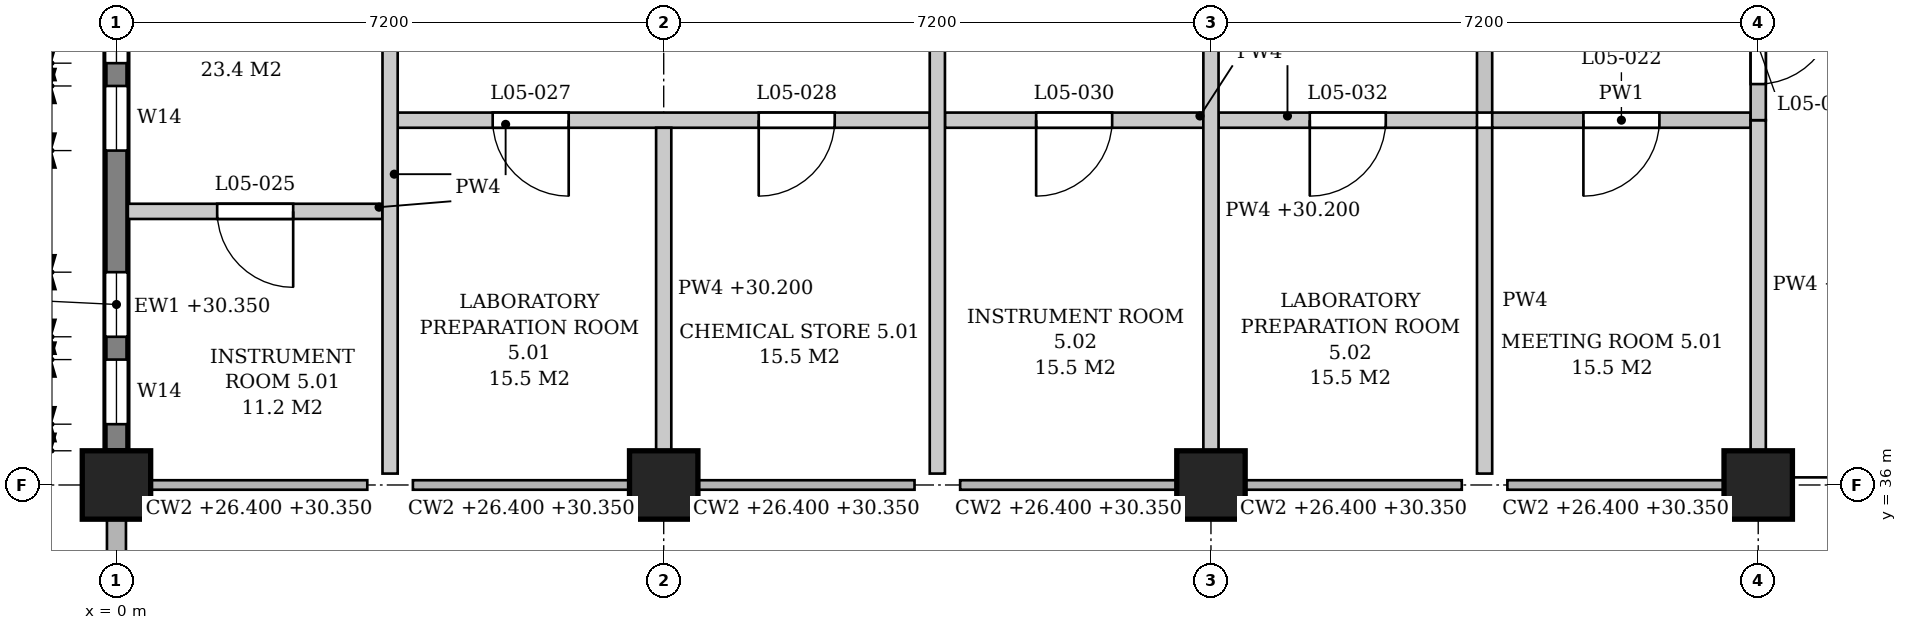
"""IFC4 building model, lengths in metres.
Left out: names, types, materials, properties, quantities, classifications, styles, units other than length and angle.
Written with IfcOpenShell. Run it as: python <this file> out.ifc"""

import sys

from ifc_helpers import new_model, si_unit, direction, frame, frame_2d, origin, origin_2d, place, context, subcontext, project, spatial, polyline, rectangle, outline, extrude, element, fill, save


model = new_model("IFC4")
c1 = context("Model", 3, precision=1e-05, world=origin(), true_north=direction((0.0, 1.0)))
c2 = subcontext(c1, "Body", "Model", "MODEL_VIEW")
j1 = project(units=[si_unit("LENGTHUNIT", "METRE"), si_unit("PLANEANGLEUNIT", "RADIAN")], contexts=[c1])
p1 = place(None, origin())
s1 = spatial("IfcSite", under=j1, at=p1, CompositionType="ELEMENT")
p2 = place(p1, origin())
s2 = spatial("IfcBuilding", under=s1, at=p2, CompositionType="ELEMENT")
p3 = place(p2, frame((0.0, 0.0, 26.4)))
s3 = spatial("IfcBuildingStorey", under=s2, at=p3, CompositionType="ELEMENT", Elevation=26.4)
for number, where, z_axis, x_axis in (
    (1, (0.0, 36.0, 0.0), (0.0, 0.0, 1.0), (1.0, 0.0, 0.0)),
    (2, (7.2, 36.0, 0.0), (0.0, 0.0, 1.0), (1.0, 0.0, 0.0)),
    (3, (14.4, 36.0, 0.0), (0.0, 0.0, 1.0), (1.0, 0.0, 0.0)),
    (4, (21.6, 36.0, 0.0), (0.0, 0.0, 1.0), (1.0, 0.0, 0.0)),
):
    element("IfcColumn", number, at=place(p3, frame(where, z_axis=z_axis, x_axis=x_axis)), inside=s3, PredefinedType="COLUMN", context=c2, shape_type="SweptSolid", body=[
        extrude(rectangle(XDim=0.9, YDim=0.9, at=origin_2d()), origin(), (0.0, 0.0, 1.0), 4.8),
    ])
p4 = place(p3, frame((0.0, 36.45, 0.0), z_axis=(0.0, 0.0, 1.0), x_axis=(0.0, 1.0, 0.0)))
e5 = element("IfcWall", 5, at=p4, inside=s3, PredefinedType="STANDARD", context=c2, shape_type="SweptSolid", body=[
    extrude(rectangle(XDim=6.3, YDim=0.3, at=frame_2d((3.15, 0.0))), origin(), (0.0, 0.0, 1.0), 3.95),
])
p5 = place(p4, frame((0.35, 0.0, 0.9)))
e6 = element("IfcOpeningElement", 6, at=p5, cuts=e5, PredefinedType="OPENING", context=c2, shape_type="SweptSolid", body=[
    extrude(outline(polyline([(0.0, 0.0), (0.85, 0.0), (0.85, 2.05), (0.425, 2.5), (0.0, 2.05), (0.0, 0.0)])), frame((0.0, 0.16, 0.0), z_axis=(0.0, -1.0, 0.0), x_axis=(1.0, 0.0, 0.0)), (0.0, 0.0, 1.0), 0.32),
])
p6 = place(p4, frame((1.5, 0.0, 0.9)))
e7 = element("IfcOpeningElement", 7, at=p6, cuts=e5, PredefinedType="OPENING", context=c2, shape_type="SweptSolid", body=[
    extrude(outline(polyline([(0.0, 0.0), (0.85, 0.0), (0.85, 2.05), (0.425, 2.5), (0.0, 2.05), (0.0, 0.0)])), frame((0.0, 0.16, 0.0), z_axis=(0.0, -1.0, 0.0), x_axis=(1.0, 0.0, 0.0)), (0.0, 0.0, 1.0), 0.32),
])
p7 = place(p4, frame((3.95, 0.0, 0.9)))
e8 = element("IfcOpeningElement", 8, at=p7, cuts=e5, PredefinedType="OPENING", context=c2, shape_type="SweptSolid", body=[
    extrude(outline(polyline([(0.0, 0.0), (0.85, 0.0), (0.85, 2.05), (0.425, 2.5), (0.0, 2.05), (0.0, 0.0)])), frame((0.0, 0.16, 0.0), z_axis=(0.0, -1.0, 0.0), x_axis=(1.0, 0.0, 0.0)), (0.0, 0.0, 1.0), 0.32),
])
p8 = place(p4, frame((5.1, 0.0, 0.9)))
e9 = element("IfcOpeningElement", 9, at=p8, cuts=e5, PredefinedType="OPENING", context=c2, shape_type="SweptSolid", body=[
    extrude(outline(polyline([(0.0, 0.0), (0.85, 0.0), (0.85, 2.05), (0.425, 2.5), (0.0, 2.05), (0.0, 0.0)])), frame((0.0, 0.16, 0.0), z_axis=(0.0, -1.0, 0.0), x_axis=(1.0, 0.0, 0.0)), (0.0, 0.0, 1.0), 0.32),
])
p9 = place(p3, frame((0.15, 39.6, 0.0), z_axis=(0.0, 0.0, 1.0), x_axis=(1.0, 0.0, 0.0)))
e10 = element("IfcWall", 10, at=p9, inside=s3, PredefinedType="PARTITIONING", context=c2, shape_type="SweptSolid", body=[
    extrude(outline(polyline([(0.0, 0.0), (3.35, 0.0), (3.35, 4.55), (0.1, 4.55), (0.1, 3.95), (0.0, 3.95), (0.0, 0.0)])), frame((0.0, 0.1, 0.0), z_axis=(0.0, -1.0, 0.0), x_axis=(1.0, 0.0, 0.0)), (0.0, 0.0, 1.0), 0.2),
])
p10 = place(p9, frame((1.175, 0.0, 0.0)))
e11 = element("IfcOpeningElement", 11, at=p10, cuts=e10, PredefinedType="OPENING", context=c2, shape_type="SweptSolid", body=[
    extrude(rectangle(XDim=1.0, YDim=2.1, at=frame_2d((0.5, 1.05))), frame((0.0, 0.11, 0.0), z_axis=(0.0, -1.0, 0.0), x_axis=(1.0, 0.0, 0.0)), (0.0, 0.0, 1.0), 0.22),
])
p11 = place(p3, frame((3.7, 40.8, 0.0), z_axis=(0.0, 0.0, 1.0), x_axis=(1.0, 0.0, 0.0)))
e12 = element("IfcWall", 12, at=p11, inside=s3, PredefinedType="PARTITIONING", context=c2, shape_type="SweptSolid", body=[
    extrude(outline(polyline([(0.0, 0.0), (7.0, 0.0), (7.0, 4.55), (3.75, 4.55), (3.75, 3.8), (3.25, 3.8), (3.25, 4.55), (0.0, 4.55), (0.0, 0.0)])), frame((0.0, 0.1, 0.0), z_axis=(0.0, -1.0, 0.0), x_axis=(1.0, 0.0, 0.0)), (0.0, 0.0, 1.0), 0.2),
])
p12 = place(p11, frame((1.25, 0.0, 0.0)))
e13 = element("IfcOpeningElement", 13, at=p12, cuts=e12, PredefinedType="OPENING", context=c2, shape_type="SweptSolid", body=[
    extrude(rectangle(XDim=1.0, YDim=2.1, at=frame_2d((0.5, 1.05))), frame((0.0, 0.11, 0.0), z_axis=(0.0, -1.0, 0.0), x_axis=(1.0, 0.0, 0.0)), (0.0, 0.0, 1.0), 0.22),
])
p13 = place(p11, frame((4.75, 0.0, 0.0)))
e14 = element("IfcOpeningElement", 14, at=p13, cuts=e12, PredefinedType="OPENING", context=c2, shape_type="SweptSolid", body=[
    extrude(rectangle(XDim=1.0, YDim=2.1, at=frame_2d((0.5, 1.05))), frame((0.0, 0.11, 0.0), z_axis=(0.0, -1.0, 0.0), x_axis=(1.0, 0.0, 0.0)), (0.0, 0.0, 1.0), 0.22),
])
p14 = place(p3, frame((10.9, 40.8, 0.0), z_axis=(0.0, 0.0, 1.0), x_axis=(1.0, 0.0, 0.0)))
e15 = element("IfcWall", 15, at=p14, inside=s3, PredefinedType="PARTITIONING", context=c2, shape_type="SweptSolid", body=[
    extrude(outline(polyline([(0.0, 0.0), (3.4, 0.0), (3.4, 3.8), (3.25, 3.8), (3.25, 4.55), (0.0, 4.55), (0.0, 0.0)])), frame((0.0, 0.1, 0.0), z_axis=(0.0, -1.0, 0.0), x_axis=(1.0, 0.0, 0.0)), (0.0, 0.0, 1.0), 0.2),
])
p15 = place(p14, frame((1.2, 0.0, 0.0)))
e16 = element("IfcOpeningElement", 16, at=p15, cuts=e15, PredefinedType="OPENING", context=c2, shape_type="SweptSolid", body=[
    extrude(rectangle(XDim=1.0, YDim=2.1, at=frame_2d((0.5, 1.05))), frame((0.0, 0.11, 0.0), z_axis=(0.0, -1.0, 0.0), x_axis=(1.0, 0.0, 0.0)), (0.0, 0.0, 1.0), 0.22),
])
p16 = place(p3, frame((14.5, 40.8, 0.0), z_axis=(0.0, 0.0, 1.0), x_axis=(1.0, 0.0, 0.0)))
e17 = element("IfcWall", 17, at=p16, inside=s3, PredefinedType="PARTITIONING", context=c2, shape_type="SweptSolid", body=[
    extrude(outline(polyline([(0.0, 0.0), (3.4, 0.0), (3.4, 4.55), (0.15, 4.55), (0.15, 3.8), (0.0, 3.8), (0.0, 0.0)])), frame((0.0, 0.1, 0.0), z_axis=(0.0, -1.0, 0.0), x_axis=(1.0, 0.0, 0.0)), (0.0, 0.0, 1.0), 0.2),
])
p17 = place(p16, frame((1.2, 0.0, 0.0)))
e18 = element("IfcOpeningElement", 18, at=p17, cuts=e17, PredefinedType="OPENING", context=c2, shape_type="SweptSolid", body=[
    extrude(rectangle(XDim=1.0, YDim=2.1, at=frame_2d((0.5, 1.05))), frame((0.0, 0.11, 0.0), z_axis=(0.0, -1.0, 0.0), x_axis=(1.0, 0.0, 0.0)), (0.0, 0.0, 1.0), 0.22),
])
p18 = place(p3, frame((18.1, 40.8, 0.0), z_axis=(0.0, 0.0, 1.0), x_axis=(1.0, 0.0, 0.0)))
e19 = element("IfcWall", 19, at=p18, inside=s3, PredefinedType="PARTITIONING", context=c2, shape_type="SweptSolid", body=[
    extrude(outline(polyline([(0.0, 0.0), (3.4, 0.0), (3.4, 3.8), (3.25, 3.8), (3.25, 4.55), (0.0, 4.55), (0.0, 0.0)])), frame((0.0, 0.1, 0.0), z_axis=(0.0, -1.0, 0.0), x_axis=(1.0, 0.0, 0.0)), (0.0, 0.0, 1.0), 0.2),
])
p19 = place(p18, frame((1.2, 0.0, 0.0)))
e20 = element("IfcOpeningElement", 20, at=p19, cuts=e19, PredefinedType="OPENING", context=c2, shape_type="SweptSolid", body=[
    extrude(rectangle(XDim=1.0, YDim=2.1, at=frame_2d((0.5, 1.05))), frame((0.0, 0.11, 0.0), z_axis=(0.0, -1.0, 0.0), x_axis=(1.0, 0.0, 0.0)), (0.0, 0.0, 1.0), 0.22),
])
p20 = place(p3, frame((3.6, 36.15, 0.0), z_axis=(0.0, 0.0, 1.0), x_axis=(0.0, 1.0, 0.0)))
e21 = element("IfcWall", 21, at=p20, inside=s3, PredefinedType="PARTITIONING", context=c2, shape_type="SweptSolid", body=[
    extrude(outline(polyline([(0.0, 0.0), (10.65, 0.0), (10.65, 4.55), (7.3, 4.55), (7.3, 3.8), (6.8, 3.8), (6.8, 4.55), (0.1, 4.55), (0.1, 3.95), (0.0, 3.95), (0.0, 0.0)])), frame((0.0, 0.1, 0.0), z_axis=(0.0, -1.0, 0.0), x_axis=(1.0, 0.0, 0.0)), (0.0, 0.0, 1.0), 0.2),
])
p21 = place(p3, frame((7.2, 36.45, 0.0), z_axis=(0.0, 0.0, 1.0), x_axis=(0.0, 1.0, 0.0)))
e22 = element("IfcWall", 22, at=p21, inside=s3, PredefinedType="PARTITIONING", context=c2, shape_type="SweptSolid", body=[
    extrude(rectangle(XDim=4.25, YDim=0.2, at=frame_2d((2.125, 0.0))), origin(), (0.0, 0.0, 1.0), 3.8),
])
p22 = place(p3, frame((10.8, 36.15, 0.0), z_axis=(0.0, 0.0, 1.0), x_axis=(0.0, 1.0, 0.0)))
e23 = element("IfcWall", 23, at=p22, inside=s3, PredefinedType="PARTITIONING", context=c2, shape_type="SweptSolid", body=[
    extrude(outline(polyline([(0.0, 0.0), (11.75, 0.0), (11.75, 4.55), (7.3, 4.55), (7.3, 3.8), (6.8, 3.8), (6.8, 4.55), (0.1, 4.55), (0.1, 3.95), (0.0, 3.95), (0.0, 0.0)])), frame((0.0, 0.1, 0.0), z_axis=(0.0, -1.0, 0.0), x_axis=(1.0, 0.0, 0.0)), (0.0, 0.0, 1.0), 0.2),
])
p23 = place(p3, frame((14.4, 36.45, 0.0), z_axis=(0.0, 0.0, 1.0), x_axis=(0.0, 1.0, 0.0)))
e24 = element("IfcWall", 24, at=p23, inside=s3, PredefinedType="PARTITIONING", context=c2, shape_type="SweptSolid", body=[
    extrude(rectangle(XDim=6.3, YDim=0.2, at=frame_2d((3.15, 0.0))), origin(), (0.0, 0.0, 1.0), 3.8),
])
p24 = place(p3, frame((18.0, 36.15, 0.0), z_axis=(0.0, 0.0, 1.0), x_axis=(0.0, 1.0, 0.0)))
e25 = element("IfcWall", 25, at=p24, inside=s3, PredefinedType="PARTITIONING", context=c2, shape_type="SweptSolid", body=[
    extrude(outline(polyline([(0.0, 0.0), (4.55, 0.0), (4.55, 4.55), (0.1, 4.55), (0.1, 3.95), (0.0, 3.95), (0.0, 0.0)])), frame((0.0, 0.1, 0.0), z_axis=(0.0, -1.0, 0.0), x_axis=(1.0, 0.0, 0.0)), (0.0, 0.0, 1.0), 0.2),
])
p25 = place(p3, frame((18.0, 40.9, 0.0), z_axis=(0.0, 0.0, 1.0), x_axis=(0.0, 1.0, 0.0)))
e26 = element("IfcWall", 26, at=p25, inside=s3, PredefinedType="PARTITIONING", context=c2, shape_type="SweptSolid", body=[
    extrude(outline(polyline([(0.0, 0.0), (7.0, 0.0), (7.0, 4.55), (2.55, 4.55), (2.55, 3.8), (2.05, 3.8), (2.05, 4.55), (0.0, 4.55), (0.0, 0.0)])), frame((0.0, 0.1, 0.0), z_axis=(0.0, -1.0, 0.0), x_axis=(1.0, 0.0, 0.0)), (0.0, 0.0, 1.0), 0.2),
])
p26 = place(p25, frame((3.0, 0.0, 0.0)))
e27 = element("IfcOpeningElement", 27, at=p26, cuts=e26, PredefinedType="OPENING", context=c2, shape_type="SweptSolid", body=[
    extrude(rectangle(XDim=1.0, YDim=2.1, at=frame_2d((0.5, 1.05))), frame((0.0, 0.11, 0.0), z_axis=(0.0, -1.0, 0.0), x_axis=(1.0, 0.0, 0.0)), (0.0, 0.0, 1.0), 0.22),
])
p27 = place(p3, frame((21.6, 36.45, 0.0), z_axis=(0.0, 0.0, 1.0), x_axis=(0.0, 1.0, 0.0)))
e28 = element("IfcWall", 28, at=p27, inside=s3, PredefinedType="PARTITIONING", context=c2, shape_type="SweptSolid", body=[
    extrude(rectangle(XDim=4.35, YDim=0.2, at=frame_2d((2.175, 0.0))), origin(), (0.0, 0.0, 1.0), 3.8),
])
p28 = place(p3, frame((21.6, 40.8, 0.0), z_axis=(0.0, 0.0, 1.0), x_axis=(0.0, 1.0, 0.0)))
e29 = element("IfcWall", 29, at=p28, inside=s3, PredefinedType="PARTITIONING", context=c2, shape_type="SweptSolid", body=[
    extrude(rectangle(XDim=1.95, YDim=0.2, at=frame_2d((0.975, 0.0))), origin(), (0.0, 0.0, 1.0), 3.8),
])
p29 = place(p28, frame((0.475, 0.0, 0.0)))
e30 = element("IfcOpeningElement", 30, at=p29, cuts=e29, PredefinedType="OPENING", context=c2, shape_type="SweptSolid", body=[
    extrude(rectangle(XDim=1.0, YDim=2.1, at=frame_2d((0.5, 1.05))), frame((0.0, 0.11, 0.0), z_axis=(0.0, -1.0, 0.0), x_axis=(1.0, 0.0, 0.0)), (0.0, 0.0, 1.0), 0.22),
])
p30 = place(p5, origin())
e31 = element("IfcWindow", 31, at=p30, inside=s3, PartitioningType="SINGLE_PANEL", PredefinedType="WINDOW", context=c2, shape_type="SweptSolid", body=[
    extrude(outline(polyline([(0.0, 0.0), (0.85, 0.0), (0.85, 2.05), (0.425, 2.5), (0.0, 2.05), (0.0, 0.0)])), frame((0.0, 0.03, 0.0), z_axis=(0.0, -1.0, 0.0), x_axis=(1.0, 0.0, 0.0)), (0.0, 0.0, 1.0), 0.06),
])
fill(e6, e31)
p31 = place(p6, origin())
e32 = element("IfcWindow", 32, at=p31, inside=s3, PartitioningType="SINGLE_PANEL", PredefinedType="WINDOW", context=c2, shape_type="SweptSolid", body=[
    extrude(outline(polyline([(0.0, 0.0), (0.85, 0.0), (0.85, 2.05), (0.425, 2.5), (0.0, 2.05), (0.0, 0.0)])), frame((0.0, 0.03, 0.0), z_axis=(0.0, -1.0, 0.0), x_axis=(1.0, 0.0, 0.0)), (0.0, 0.0, 1.0), 0.06),
])
fill(e7, e32)
p32 = place(p7, origin())
e33 = element("IfcWindow", 33, at=p32, inside=s3, PartitioningType="SINGLE_PANEL", PredefinedType="WINDOW", context=c2, shape_type="SweptSolid", body=[
    extrude(outline(polyline([(0.0, 0.0), (0.85, 0.0), (0.85, 2.05), (0.425, 2.5), (0.0, 2.05), (0.0, 0.0)])), frame((0.0, 0.03, 0.0), z_axis=(0.0, -1.0, 0.0), x_axis=(1.0, 0.0, 0.0)), (0.0, 0.0, 1.0), 0.06),
])
fill(e8, e33)
p33 = place(p8, origin())
e34 = element("IfcWindow", 34, at=p33, inside=s3, PartitioningType="SINGLE_PANEL", PredefinedType="WINDOW", context=c2, shape_type="SweptSolid", body=[
    extrude(outline(polyline([(0.0, 0.0), (0.85, 0.0), (0.85, 2.05), (0.425, 2.5), (0.0, 2.05), (0.0, 0.0)])), frame((0.0, 0.03, 0.0), z_axis=(0.0, -1.0, 0.0), x_axis=(1.0, 0.0, 0.0)), (0.0, 0.0, 1.0), 0.06),
])
fill(e9, e34)
p34 = place(p19, frame((1.0, 0.0, 0.0), z_axis=(0.0, 0.0, 1.0), x_axis=(-1.0, 0.0, 0.0)))
e35 = element("IfcDoor", 35, at=p34, inside=s3, OperationType="SINGLE_SWING_RIGHT", PredefinedType="DOOR", context=c2, shape_type="SweptSolid", body=[
    extrude(rectangle(XDim=1.0, YDim=2.1, at=frame_2d((0.5, 1.05))), frame((0.0, 0.025, 0.0), z_axis=(0.0, -1.0, 0.0), x_axis=(1.0, 0.0, 0.0)), (0.0, 0.0, 1.0), 0.05),
])
fill(e20, e35)
p35 = place(p29, frame((1.0, 0.0, 0.0), z_axis=(0.0, 0.0, 1.0), x_axis=(-1.0, 0.0, 0.0)))
e36 = element("IfcDoor", 36, at=p35, inside=s3, OperationType="SINGLE_SWING_LEFT", PredefinedType="DOOR", context=c2, shape_type="SweptSolid", body=[
    extrude(rectangle(XDim=1.0, YDim=2.1, at=frame_2d((0.5, 1.05))), frame((0.0, 0.025, 0.0), z_axis=(0.0, -1.0, 0.0), x_axis=(1.0, 0.0, 0.0)), (0.0, 0.0, 1.0), 0.05),
])
fill(e30, e36)
p36 = place(p10, frame((1.0, 0.0, 0.0), z_axis=(0.0, 0.0, 1.0), x_axis=(-1.0, 0.0, 0.0)))
e37 = element("IfcDoor", 37, at=p36, inside=s3, OperationType="SINGLE_SWING_LEFT", PredefinedType="DOOR", context=c2, shape_type="SweptSolid", body=[
    extrude(rectangle(XDim=1.0, YDim=2.1, at=frame_2d((0.5, 1.05))), frame((0.0, 0.025, 0.0), z_axis=(0.0, -1.0, 0.0), x_axis=(1.0, 0.0, 0.0)), (0.0, 0.0, 1.0), 0.05),
])
fill(e11, e37)
p37 = place(p12, frame((1.0, 0.0, 0.0), z_axis=(0.0, 0.0, 1.0), x_axis=(-1.0, 0.0, 0.0)))
e38 = element("IfcDoor", 38, at=p37, inside=s3, OperationType="SINGLE_SWING_LEFT", PredefinedType="DOOR", context=c2, shape_type="SweptSolid", body=[
    extrude(rectangle(XDim=1.0, YDim=2.1, at=frame_2d((0.5, 1.05))), frame((0.0, 0.025, 0.0), z_axis=(0.0, -1.0, 0.0), x_axis=(1.0, 0.0, 0.0)), (0.0, 0.0, 1.0), 0.05),
])
fill(e13, e38)
p38 = place(p13, frame((1.0, 0.0, 0.0), z_axis=(0.0, 0.0, 1.0), x_axis=(-1.0, 0.0, 0.0)))
e39 = element("IfcDoor", 39, at=p38, inside=s3, OperationType="SINGLE_SWING_RIGHT", PredefinedType="DOOR", context=c2, shape_type="SweptSolid", body=[
    extrude(rectangle(XDim=1.0, YDim=2.1, at=frame_2d((0.5, 1.05))), frame((0.0, 0.025, 0.0), z_axis=(0.0, -1.0, 0.0), x_axis=(1.0, 0.0, 0.0)), (0.0, 0.0, 1.0), 0.05),
])
fill(e14, e39)
p39 = place(p15, frame((1.0, 0.0, 0.0), z_axis=(0.0, 0.0, 1.0), x_axis=(-1.0, 0.0, 0.0)))
e40 = element("IfcDoor", 40, at=p39, inside=s3, OperationType="SINGLE_SWING_RIGHT", PredefinedType="DOOR", context=c2, shape_type="SweptSolid", body=[
    extrude(rectangle(XDim=1.0, YDim=2.1, at=frame_2d((0.5, 1.05))), frame((0.0, 0.025, 0.0), z_axis=(0.0, -1.0, 0.0), x_axis=(1.0, 0.0, 0.0)), (0.0, 0.0, 1.0), 0.05),
])
fill(e16, e40)
p40 = place(p17, frame((1.0, 0.0, 0.0), z_axis=(0.0, 0.0, 1.0), x_axis=(-1.0, 0.0, 0.0)))
e41 = element("IfcDoor", 41, at=p40, inside=s3, OperationType="SINGLE_SWING_RIGHT", PredefinedType="DOOR", context=c2, shape_type="SweptSolid", body=[
    extrude(rectangle(XDim=1.0, YDim=2.1, at=frame_2d((0.5, 1.05))), frame((0.0, 0.025, 0.0), z_axis=(0.0, -1.0, 0.0), x_axis=(1.0, 0.0, 0.0)), (0.0, 0.0, 1.0), 0.05),
])
fill(e18, e41)
save(model, sys.argv[1])
